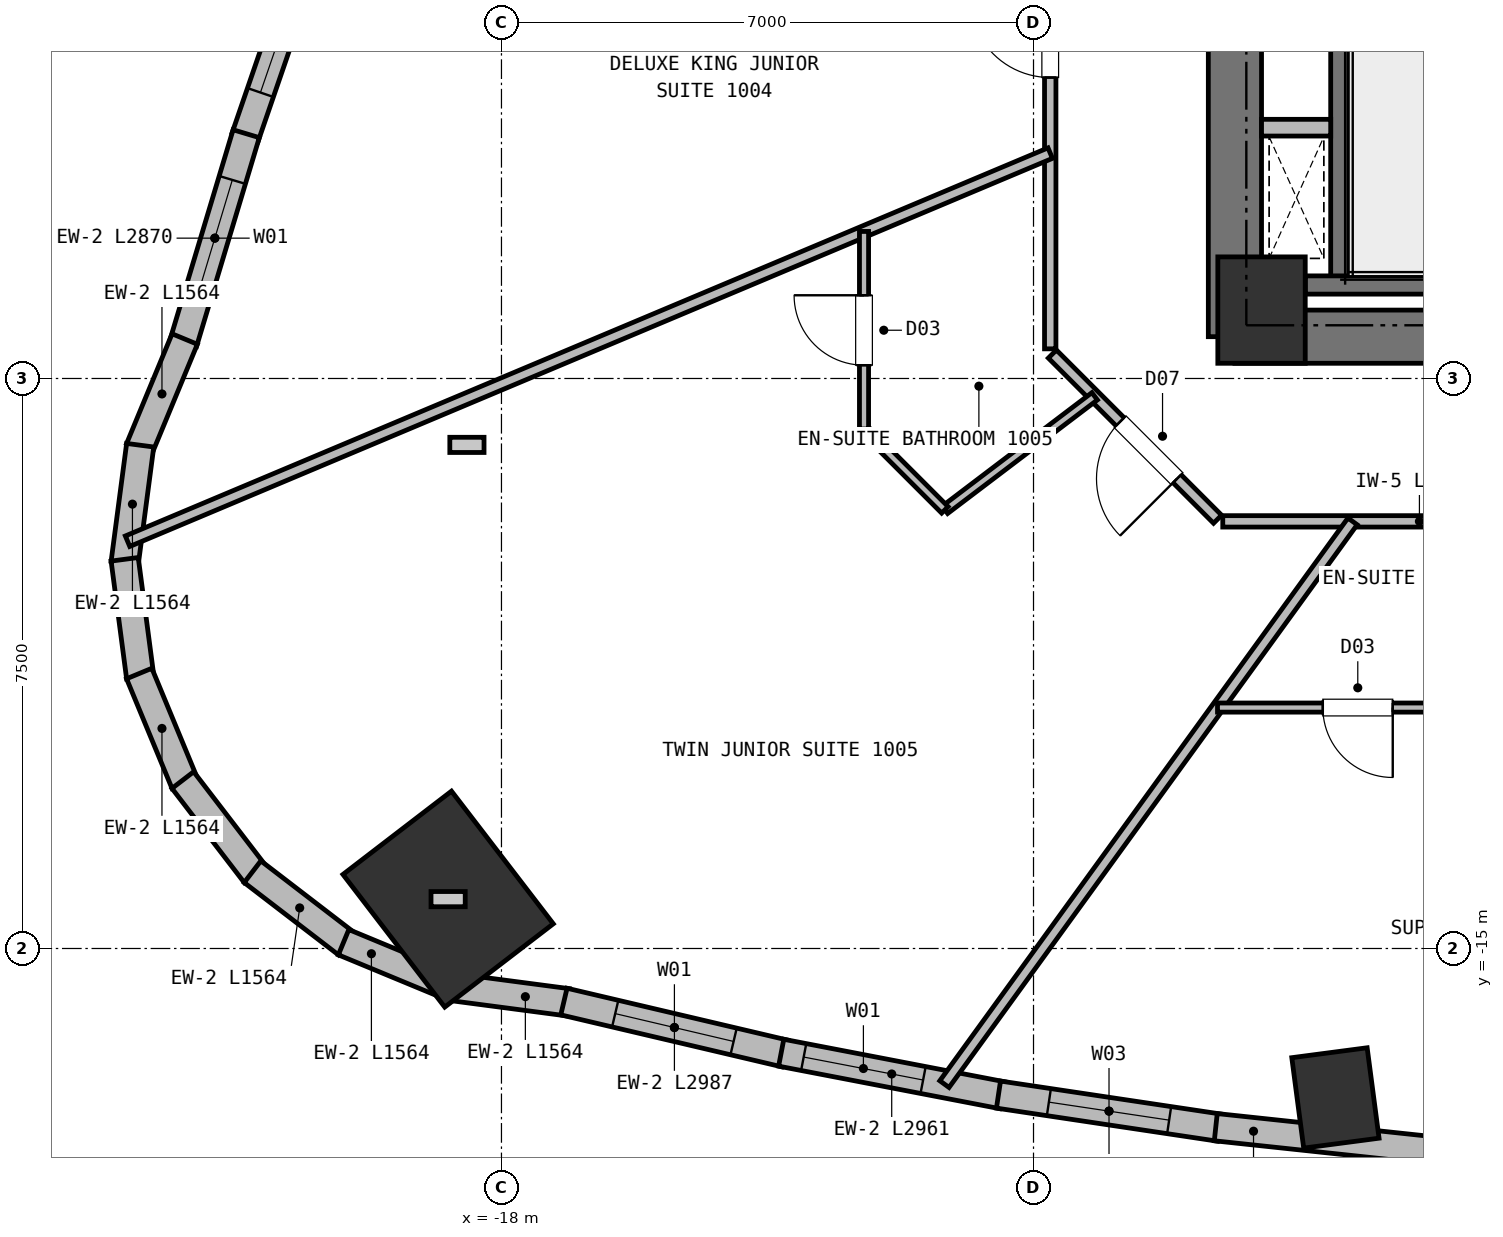
"""IFC4 building model, lengths in metres.
Left out: names, types, materials, properties, quantities, classifications, styles, units other than length and angle.
Written with IfcOpenShell. Run it as: python <this file> out.ifc"""

import sys

from ifc_helpers import new_model, si_unit, direction, frame, frame_2d, origin, origin_2d, place, context, subcontext, project, spatial, rectangle, extrude, element, fill, save


model = new_model("IFC4")
c1 = context("Model", 3, precision=1e-05, world=origin(), true_north=direction((0.0, 1.0)))
c2 = subcontext(c1, "Body", "Model", "MODEL_VIEW")
j1 = project(units=[si_unit("LENGTHUNIT", "METRE"), si_unit("PLANEANGLEUNIT", "RADIAN")], contexts=[c1])
p1 = place(None, origin())
s1 = spatial("IfcSite", under=j1, at=p1, CompositionType="ELEMENT")
p2 = place(p1, origin())
s2 = spatial("IfcBuilding", under=s1, at=p2, CompositionType="ELEMENT")
p3 = place(p2, frame((0.0, 0.0, 34.25)))
s3 = spatial("IfcBuildingStorey", under=s2, at=p3, CompositionType="ELEMENT", Elevation=34.25)
p4 = place(p3, frame((-8.0, -6.6, 0.0), z_axis=(0.0, 0.0, 1.0), x_axis=(1.0, 0.0, 0.0)))
e1 = element("IfcColumn", 1, at=p4, inside=s3, PredefinedType="COLUMN", context=c2, shape_type="SweptSolid", body=[
    extrude(rectangle(XDim=1.15, YDim=1.4, at=origin_2d()), origin(), (0.0, 0.0, 1.0), 3.75),
])
p5 = place(p3, frame((-8.35, -6.95, 0.0), z_axis=(0.0, 0.0, 1.0), x_axis=(1.0, 0.0, 0.0)))
e2 = element("IfcWall", 2, at=p5, inside=s3, PredefinedType="SHEAR", context=c2, shape_type="SweptSolid", body=[
    extrude(rectangle(XDim=3.95, YDim=0.7, at=frame_2d((1.975, 0.0))), origin(), (0.0, 0.0, 1.0), 3.5),
])
p6 = place(p3, frame((-8.35, -6.95, 0.0), z_axis=(0.0, 0.0, 1.0), x_axis=(0.0, 1.0, 0.0)))
e3 = element("IfcWall", 3, at=p6, inside=s3, PredefinedType="SHEAR", context=c2, shape_type="SweptSolid", body=[
    extrude(rectangle(XDim=8.1, YDim=0.7, at=frame_2d((4.05, 0.0))), origin(), (0.0, 0.0, 1.0), 3.5),
])
p7 = place(p3, frame((-18.702, -14.351, 0.0), z_axis=(0.0, 0.0, 1.0), x_axis=(0.793353340291, 0.608761429009, 0.0)))
e4 = element("IfcColumn", 4, at=p7, inside=s3, PredefinedType="COLUMN", context=c2, shape_type="SweptSolid", body=[
    extrude(rectangle(XDim=1.8, YDim=2.2, at=origin_2d()), origin(), (0.0, 0.0, 1.0), 3.75),
])
p8 = place(p3, frame((-7.028, -16.966, 0.0), z_axis=(0.0, 0.0, 1.0), x_axis=(0.991444861374, 0.13052619222, 0.0)))
e5 = element("IfcColumn", 5, at=p8, inside=s3, PredefinedType="COLUMN", context=c2, shape_type="SweptSolid", body=[
    extrude(rectangle(XDim=1.0, YDim=1.2, at=origin_2d()), origin(), (0.0, 0.0, 1.0), 3.75),
])
p9 = place(p3, frame((-21.374, -4.327, 0.0), z_axis=(0.0, 0.0, 1.0), x_axis=(0.325091754677, 0.945682478975, 0.0)))
e6 = element("IfcWall", 6, at=p9, inside=s3, PredefinedType="SOLIDWALL", context=c2, shape_type="SweptSolid", body=[
    extrude(rectangle(XDim=2.846, YDim=0.36, at=frame_2d((1.423, 0.0))), origin(), (0.0, 0.0, 1.0), 3.5),
])
p10 = place(p9, frame((0.623, 0.0, 0.72)))
e7 = element("IfcOpeningElement", 7, at=p10, cuts=e6, PredefinedType="OPENING", context=c2, shape_type="SweptSolid", body=[
    extrude(rectangle(XDim=1.6, YDim=1.88, at=frame_2d((0.8, 0.94))), frame((0.0, 0.19, 0.0), z_axis=(0.0, -1.0, 0.0), x_axis=(1.0, 0.0, 0.0)), (0.0, 0.0, 1.0), 0.38),
])
p11 = place(p3, frame((-22.184, -7.028, 0.0), z_axis=(0.0, 0.0, 1.0), x_axis=(0.287784902043, 0.957695071594, 0.0)))
e8 = element("IfcWall", 8, at=p11, inside=s3, PredefinedType="SOLIDWALL", context=c2, shape_type="SweptSolid", body=[
    extrude(rectangle(XDim=2.87, YDim=0.36, at=frame_2d((1.435, 0.0))), origin(), (0.0, 0.0, 1.0), 3.5),
])
p12 = place(p11, frame((0.635, 0.0, 0.72)))
e9 = element("IfcOpeningElement", 9, at=p12, cuts=e8, PredefinedType="OPENING", context=c2, shape_type="SweptSolid", body=[
    extrude(rectangle(XDim=1.6, YDim=1.88, at=frame_2d((0.8, 0.94))), frame((0.0, 0.19, 0.0), z_axis=(0.0, -1.0, 0.0), x_axis=(1.0, 0.0, 0.0)), (0.0, 0.0, 1.0), 0.38),
])
for number, where, z_axis, x_axis in (
    (10, (-22.766, -8.426, 0.0), (0.0, 0.0, 1.0), (0.383, 0.924, 0.0)),
    (11, (-22.958, -9.929, 0.0), (0.0, 0.0, 1.0), (0.131, 0.991, 0.0)),
    (12, (-22.753, -11.43, 0.0), (0.0, 0.0, 1.0), (-0.131, 0.991, 0.0)),
):
    element("IfcWall", number, at=place(p3, frame(where, z_axis=z_axis, x_axis=x_axis)), inside=s3, PredefinedType="SOLIDWALL", context=c2, shape_type="SweptSolid", body=[
        extrude(rectangle(XDim=1.564, YDim=0.36, at=frame_2d((0.782, 0.0))), origin(), (0.0, 0.0, 1.0), 3.5),
    ])
p13 = place(p3, frame((-22.167, -12.827, 0.0), z_axis=(0.0, 0.0, 1.0), x_axis=(-0.382774588958, 0.923841768945, 0.0)))
e13 = element("IfcWall", 13, at=p13, inside=s3, PredefinedType="SOLIDWALL", context=c2, shape_type="SweptSolid", body=[
    extrude(rectangle(XDim=1.564, YDim=0.36, at=frame_2d((0.782, 0.0))), origin(), (0.0, 0.0, 1.0), 3.5),
])
for number, where, z_axis, x_axis in (
    (14, (-21.24, -14.025, 0.0), (0.0, 0.0, 1.0), (-0.609, 0.793, 0.0)),
    (15, (-20.034, -14.942, 0.0), (0.0, 0.0, 1.0), (-0.793, 0.609, 0.0)),
    (16, (-18.632, -15.516, 0.0), (0.0, 0.0, 1.0), (-0.924, 0.383, 0.0)),
    (17, (-17.129, -15.707, 0.0), (0.0, 0.0, 1.0), (-0.991, 0.131, 0.0)),
):
    element("IfcWall", number, at=place(p3, frame(where, z_axis=z_axis, x_axis=x_axis)), inside=s3, PredefinedType="SOLIDWALL", context=c2, shape_type="SweptSolid", body=[
        extrude(rectangle(XDim=1.564, YDim=0.36, at=frame_2d((0.782, 0.0))), origin(), (0.0, 0.0, 1.0), 3.5),
    ])
p14 = place(p3, frame((-14.271, -16.382, 0.0), z_axis=(0.0, 0.0, 1.0), x_axis=(-0.973460028485, 0.228857101575, 0.0)))
e18 = element("IfcWall", 18, at=p14, inside=s3, PredefinedType="SOLIDWALL", context=c2, shape_type="SweptSolid", body=[
    extrude(rectangle(XDim=2.987, YDim=0.36, at=frame_2d((1.494, 0.0))), origin(), (0.0, 0.0, 1.0), 3.5),
])
p15 = place(p14, frame((0.694, 0.0, 0.72)))
e19 = element("IfcOpeningElement", 19, at=p15, cuts=e18, PredefinedType="OPENING", context=c2, shape_type="SweptSolid", body=[
    extrude(rectangle(XDim=1.6, YDim=1.88, at=frame_2d((0.8, 0.94))), frame((0.0, 0.19, 0.0), z_axis=(0.0, -1.0, 0.0), x_axis=(1.0, 0.0, 0.0)), (0.0, 0.0, 1.0), 0.38),
])
p16 = place(p3, frame((-11.412, -16.931, 0.0), z_axis=(0.0, 0.0, 1.0), x_axis=(-0.981984682903, 0.188960531711, 0.0)))
e20 = element("IfcWall", 20, at=p16, inside=s3, PredefinedType="SOLIDWALL", context=c2, shape_type="SweptSolid", body=[
    extrude(rectangle(XDim=2.961, YDim=0.36, at=frame_2d((1.481, 0.0))), origin(), (0.0, 0.0, 1.0), 3.5),
])
p17 = place(p16, frame((1.06, 0.0, 0.72)))
e21 = element("IfcOpeningElement", 21, at=p17, cuts=e20, PredefinedType="OPENING", context=c2, shape_type="SweptSolid", body=[
    extrude(rectangle(XDim=1.6, YDim=1.88, at=frame_2d((0.8, 0.94))), frame((0.0, 0.19, 0.0), z_axis=(0.0, -1.0, 0.0), x_axis=(1.0, 0.0, 0.0)), (0.0, 0.0, 1.0), 0.38),
])
p18 = place(p3, frame((-8.552, -17.358, 0.0), z_axis=(0.0, 0.0, 1.0), x_axis=(-0.988982587095, 0.148031896641, 0.0)))
e22 = element("IfcWall", 22, at=p18, inside=s3, PredefinedType="SOLIDWALL", context=c2, shape_type="SweptSolid", body=[
    extrude(rectangle(XDim=2.941, YDim=0.36, at=frame_2d((1.47, 0.0))), origin(), (0.0, 0.0, 1.0), 3.5),
])
p19 = place(p18, frame((0.67, 0.0, 0.72)))
e23 = element("IfcOpeningElement", 23, at=p19, cuts=e22, PredefinedType="OPENING", context=c2, shape_type="SweptSolid", body=[
    extrude(rectangle(XDim=1.6, YDim=1.88, at=frame_2d((0.8, 0.94))), frame((0.0, 0.19, 0.0), z_axis=(0.0, -1.0, 0.0), x_axis=(1.0, 0.0, 0.0)), (0.0, 0.0, 1.0), 0.38),
])
p20 = place(p3, frame((-5.693, -17.662, 0.0), z_axis=(0.0, 0.0, 1.0), x_axis=(-0.994340996166, 0.106235508864, 0.0)))
e24 = element("IfcWall", 24, at=p20, inside=s3, PredefinedType="SOLIDWALL", context=c2, shape_type="SweptSolid", body=[
    extrude(rectangle(XDim=2.926, YDim=0.36, at=frame_2d((1.463, 0.0))), origin(), (0.0, 0.0, 1.0), 3.5),
])
p21 = place(p3, frame((-6.97, -6.16, 0.0), z_axis=(0.0, 0.0, 1.0), x_axis=(0.0, 1.0, 0.0)))
e25 = element("IfcWall", 25, at=p21, inside=s3, PredefinedType="SHEAR", context=c2, shape_type="SweptSolid", body=[
    extrude(rectangle(XDim=7.22, YDim=0.24, at=frame_2d((3.61, 0.0))), origin(), (0.0, 0.0, 1.0), 3.5),
])
p22 = place(p3, frame((-7.425, -6.27, 0.0), z_axis=(0.0, 0.0, 1.0), x_axis=(1.0, 0.0, 0.0)))
e26 = element("IfcWall", 26, at=p22, inside=s3, PredefinedType="SHEAR", context=c2, shape_type="SweptSolid", body=[
    extrude(rectangle(XDim=3.415, YDim=0.24, at=frame_2d((1.708, 0.0))), origin(), (0.0, 0.0, 1.0), 3.5),
])
p23 = place(p3, frame((-8.0, -4.2, 0.0), z_axis=(0.0, 0.0, 1.0), x_axis=(1.0, 0.0, 0.0)))
e27 = element("IfcWall", 27, at=p23, inside=s3, PredefinedType="PARTITIONING", context=c2, shape_type="SweptSolid", body=[
    extrude(rectangle(XDim=0.91, YDim=0.22, at=frame_2d((0.455, 0.0))), origin(), (0.0, 0.0, 1.0), 3.5),
])
p24 = place(p3, frame((8.51, -9.38, 0.0), z_axis=(0.0, 0.0, 1.0), x_axis=(-1.0, 0.0, 0.0)))
e28 = element("IfcWall", 28, at=p24, inside=s3, PredefinedType="PARTITIONING", context=c2, shape_type="SweptSolid", body=[
    extrude(rectangle(XDim=17.02, YDim=0.15, at=frame_2d((8.51, 0.0))), origin(), (0.0, 0.0, 1.0), 3.5),
])
p25 = place(p24, frame((6.065, 0.0, 0.0)))
e29 = element("IfcOpeningElement", 29, at=p25, cuts=e28, PredefinedType="OPENING", context=c2, shape_type="SweptSolid", body=[
    extrude(rectangle(XDim=1.0, YDim=2.15, at=frame_2d((0.5, 1.075))), frame((0.0, 0.085, 0.0), z_axis=(0.0, -1.0, 0.0), x_axis=(1.0, 0.0, 0.0)), (0.0, 0.0, 1.0), 0.17),
])
p26 = place(p24, frame((10.745, 0.0, 0.0)))
e30 = element("IfcOpeningElement", 30, at=p26, cuts=e28, PredefinedType="OPENING", context=c2, shape_type="SweptSolid", body=[
    extrude(rectangle(XDim=1.0, YDim=2.15, at=frame_2d((0.5, 1.075))), frame((0.0, 0.085, 0.0), z_axis=(0.0, -1.0, 0.0), x_axis=(1.0, 0.0, 0.0)), (0.0, 0.0, 1.0), 0.17),
])
p27 = place(p24, frame((0.14, 0.0, 0.0)))
e31 = element("IfcOpeningElement", 31, at=p27, cuts=e28, PredefinedType="OPENING", context=c2, shape_type="SweptSolid", body=[
    extrude(rectangle(XDim=1.06, YDim=2.15, at=frame_2d((0.53, 1.075))), frame((0.0, 0.085, 0.0), z_axis=(0.0, -1.0, 0.0), x_axis=(1.0, 0.0, 0.0)), (0.0, 0.0, 1.0), 0.17),
])
p28 = place(p3, frame((-10.78, -7.11, 0.0), z_axis=(0.0, 0.0, 1.0), x_axis=(0.0, 1.0, 0.0)))
e32 = element("IfcWall", 32, at=p28, inside=s3, PredefinedType="PARTITIONING", context=c2, shape_type="SweptSolid", body=[
    extrude(rectangle(XDim=14.22, YDim=0.15, at=frame_2d((7.11, 0.0))), origin(), (0.0, 0.0, 1.0), 3.12),
])
p29 = place(p28, frame((10.606, 0.0, 0.0)))
e33 = element("IfcOpeningElement", 33, at=p29, cuts=e32, PredefinedType="OPENING", context=c2, shape_type="SweptSolid", body=[
    extrude(rectangle(XDim=1.0, YDim=2.15, at=frame_2d((0.5, 1.075))), frame((0.0, 0.085, 0.0), z_axis=(0.0, -1.0, 0.0), x_axis=(1.0, 0.0, 0.0)), (0.0, 0.0, 1.0), 0.17),
])
p30 = place(p28, frame((3.57, 0.0, 0.0)))
e34 = element("IfcOpeningElement", 34, at=p30, cuts=e32, PredefinedType="OPENING", context=c2, shape_type="SweptSolid", body=[
    extrude(rectangle(XDim=1.06, YDim=2.15, at=frame_2d((0.53, 1.075))), frame((0.0, 0.085, 0.0), z_axis=(0.0, -1.0, 0.0), x_axis=(1.0, 0.0, 0.0)), (0.0, 0.0, 1.0), 0.17),
])
p31 = place(p3, frame((-8.578, -9.352, 0.0), z_axis=(0.0, 0.0, 1.0), x_axis=(-0.707067066127, 0.707146494016, 0.0)))
e35 = element("IfcWall", 35, at=p31, inside=s3, PredefinedType="PARTITIONING", context=c2, shape_type="SweptSolid", body=[
    extrude(rectangle(XDim=3.074, YDim=0.15, at=frame_2d((1.537, 0.0))), origin(), (0.0, 0.0, 1.0), 3.5),
])
p32 = place(p31, frame((0.754, 0.0, 0.0)))
e36 = element("IfcOpeningElement", 36, at=p32, cuts=e35, PredefinedType="OPENING", context=c2, shape_type="SweptSolid", body=[
    extrude(rectangle(XDim=1.06, YDim=2.15, at=frame_2d((0.53, 1.075))), frame((0.0, 0.085, 0.0), z_axis=(0.0, -1.0, 0.0), x_axis=(1.0, 0.0, 0.0)), (0.0, 0.0, 1.0), 0.17),
])
p33 = place(p3, frame((-10.78, -4.535, 0.0), z_axis=(0.0, 0.0, 1.0), x_axis=(-0.921767922979, -0.387742048489, 0.0)))
e37 = element("IfcWall", 37, at=p33, inside=s3, PredefinedType="PARTITIONING", context=c2, shape_type="SweptSolid", body=[
    extrude(rectangle(XDim=13.17, YDim=0.15, at=frame_2d((6.585, 0.0))), origin(), (0.0, 0.0, 1.0), 3.5),
])
p34 = place(p3, frame((-12.166, -9.229, 0.0), z_axis=(0.0, 0.0, 1.0), x_axis=(0.796694549239, 0.604382159906, 0.0)))
e38 = element("IfcWall", 38, at=p34, inside=s3, PredefinedType="PARTITIONING", context=c2, shape_type="SweptSolid", body=[
    extrude(rectangle(XDim=2.473, YDim=0.12, at=frame_2d((1.236, 0.0))), origin(), (0.0, 0.0, 1.0), 3.5),
])
p35 = place(p3, frame((-12.166, -9.229, 0.0), z_axis=(0.0, 0.0, 1.0), x_axis=(-0.707106781187, 0.707106781187, 0.0)))
e39 = element("IfcWall", 39, at=p35, inside=s3, PredefinedType="PARTITIONING", context=c2, shape_type="SweptSolid", body=[
    extrude(rectangle(XDim=1.505, YDim=0.12, at=frame_2d((0.752, 0.0))), origin(), (0.0, 0.0, 1.0), 3.5),
])
p36 = place(p3, frame((-13.23, -8.165, 0.0), z_axis=(0.0, 0.0, 1.0), x_axis=(0.0, 1.0, 0.0)))
e40 = element("IfcWall", 40, at=p36, inside=s3, PredefinedType="PARTITIONING", context=c2, shape_type="SweptSolid", body=[
    extrude(rectangle(XDim=2.6, YDim=0.12, at=frame_2d((1.3, 0.0))), origin(), (0.0, 0.0, 1.0), 3.12),
])
p37 = place(p36, frame((0.84, 0.0, 0.0)))
e41 = element("IfcOpeningElement", 41, at=p37, cuts=e40, PredefinedType="OPENING", context=c2, shape_type="SweptSolid", body=[
    extrude(rectangle(XDim=0.92, YDim=2.1, at=frame_2d((0.46, 1.05))), frame((0.0, 0.07, 0.0), z_axis=(0.0, -1.0, 0.0), x_axis=(1.0, 0.0, 0.0)), (0.0, 0.0, 1.0), 0.14),
])
p38 = place(p3, frame((-6.802, -9.38, 0.0), z_axis=(0.0, 0.0, 1.0), x_axis=(-0.58706335667, -0.809540990472, 0.0)))
e42 = element("IfcWall", 42, at=p38, inside=s3, PredefinedType="PARTITIONING", context=c2, shape_type="SweptSolid", body=[
    extrude(rectangle(XDim=9.146, YDim=0.15, at=frame_2d((4.573, 0.0))), origin(), (0.0, 0.0, 1.0), 3.5),
])
p39 = place(p3, frame((-4.888, -11.83, 0.0), z_axis=(0.0, 0.0, 1.0), x_axis=(-1.0, 0.0, 0.0)))
e43 = element("IfcWall", 43, at=p39, inside=s3, PredefinedType="PARTITIONING", context=c2, shape_type="SweptSolid", body=[
    extrude(rectangle(XDim=3.691, YDim=0.12, at=frame_2d((1.846, 0.0))), origin(), (0.0, 0.0, 1.0), 3.5),
])
p40 = place(p39, frame((1.385, 0.0, 0.0)))
e44 = element("IfcOpeningElement", 44, at=p40, cuts=e43, PredefinedType="OPENING", context=c2, shape_type="SweptSolid", body=[
    extrude(rectangle(XDim=0.92, YDim=2.1, at=frame_2d((0.46, 1.05))), frame((0.0, 0.07, 0.0), z_axis=(0.0, -1.0, 0.0), x_axis=(1.0, 0.0, 0.0)), (0.0, 0.0, 1.0), 0.14),
])
p41 = place(p10, origin())
e45 = element("IfcWindow", 45, at=p41, inside=s3, PartitioningType="SINGLE_PANEL", PredefinedType="WINDOW", context=c2, shape_type="SweptSolid", body=[
    extrude(rectangle(XDim=1.6, YDim=1.88, at=frame_2d((0.8, 0.94))), frame((0.0, 0.03, 0.0), z_axis=(0.0, -1.0, 0.0), x_axis=(1.0, 0.0, 0.0)), (0.0, 0.0, 1.0), 0.06),
])
fill(e7, e45)
p42 = place(p12, origin())
e46 = element("IfcWindow", 46, at=p42, inside=s3, PartitioningType="SINGLE_PANEL", PredefinedType="WINDOW", context=c2, shape_type="SweptSolid", body=[
    extrude(rectangle(XDim=1.6, YDim=1.88, at=frame_2d((0.8, 0.94))), frame((0.0, 0.03, 0.0), z_axis=(0.0, -1.0, 0.0), x_axis=(1.0, 0.0, 0.0)), (0.0, 0.0, 1.0), 0.06),
])
fill(e9, e46)
p43 = place(p15, origin())
e47 = element("IfcWindow", 47, at=p43, inside=s3, PartitioningType="SINGLE_PANEL", PredefinedType="WINDOW", context=c2, shape_type="SweptSolid", body=[
    extrude(rectangle(XDim=1.6, YDim=1.88, at=frame_2d((0.8, 0.94))), frame((0.0, 0.03, 0.0), z_axis=(0.0, -1.0, 0.0), x_axis=(1.0, 0.0, 0.0)), (0.0, 0.0, 1.0), 0.06),
])
fill(e19, e47)
p44 = place(p17, origin())
e48 = element("IfcWindow", 48, at=p44, inside=s3, PartitioningType="SINGLE_PANEL", PredefinedType="WINDOW", context=c2, shape_type="SweptSolid", body=[
    extrude(rectangle(XDim=1.6, YDim=1.88, at=frame_2d((0.8, 0.94))), frame((0.0, 0.03, 0.0), z_axis=(0.0, -1.0, 0.0), x_axis=(1.0, 0.0, 0.0)), (0.0, 0.0, 1.0), 0.06),
])
fill(e21, e48)
p45 = place(p19, origin())
e49 = element("IfcWindow", 49, at=p45, inside=s3, PartitioningType="SINGLE_PANEL", PredefinedType="WINDOW", context=c2, shape_type="SweptSolid", body=[
    extrude(rectangle(XDim=1.6, YDim=1.88, at=frame_2d((0.8, 0.94))), frame((0.0, 0.03, 0.0), z_axis=(0.0, -1.0, 0.0), x_axis=(1.0, 0.0, 0.0)), (0.0, 0.0, 1.0), 0.06),
])
fill(e23, e49)
p46 = place(p37, origin())
e50 = element("IfcDoor", 50, at=p46, inside=s3, OperationType="SINGLE_SWING_RIGHT", PredefinedType="DOOR", context=c2, shape_type="SweptSolid", body=[
    extrude(rectangle(XDim=0.92, YDim=2.1, at=frame_2d((0.46, 1.05))), frame((0.0, 0.025, 0.0), z_axis=(0.0, -1.0, 0.0), x_axis=(1.0, 0.0, 0.0)), (0.0, 0.0, 1.0), 0.05),
])
fill(e41, e50)
p47 = place(p40, origin())
e51 = element("IfcDoor", 51, at=p47, inside=s3, OperationType="SINGLE_SWING_LEFT", PredefinedType="DOOR", context=c2, shape_type="SweptSolid", body=[
    extrude(rectangle(XDim=0.92, YDim=2.1, at=frame_2d((0.46, 1.05))), frame((0.0, 0.025, 0.0), z_axis=(0.0, -1.0, 0.0), x_axis=(1.0, 0.0, 0.0)), (0.0, 0.0, 1.0), 0.05),
])
fill(e44, e51)
p48 = place(p30, origin())
e52 = element("IfcDoor", 52, at=p48, inside=s3, OperationType="SINGLE_SWING_RIGHT", PredefinedType="DOOR", context=c2, shape_type="SweptSolid", body=[
    extrude(rectangle(XDim=1.06, YDim=2.15, at=frame_2d((0.53, 1.075))), frame((0.0, 0.025, 0.0), z_axis=(0.0, -1.0, 0.0), x_axis=(1.0, 0.0, 0.0)), (0.0, 0.0, 1.0), 0.05),
])
fill(e34, e52)
p49 = place(p32, origin())
e53 = element("IfcDoor", 53, at=p49, inside=s3, OperationType="SINGLE_SWING_LEFT", PredefinedType="DOOR", context=c2, shape_type="SweptSolid", body=[
    extrude(rectangle(XDim=1.06, YDim=2.15, at=frame_2d((0.53, 1.075))), frame((0.0, 0.025, 0.0), z_axis=(0.0, -1.0, 0.0), x_axis=(1.0, 0.0, 0.0)), (0.0, 0.0, 1.0), 0.05),
])
fill(e36, e53)
save(model, sys.argv[1])
